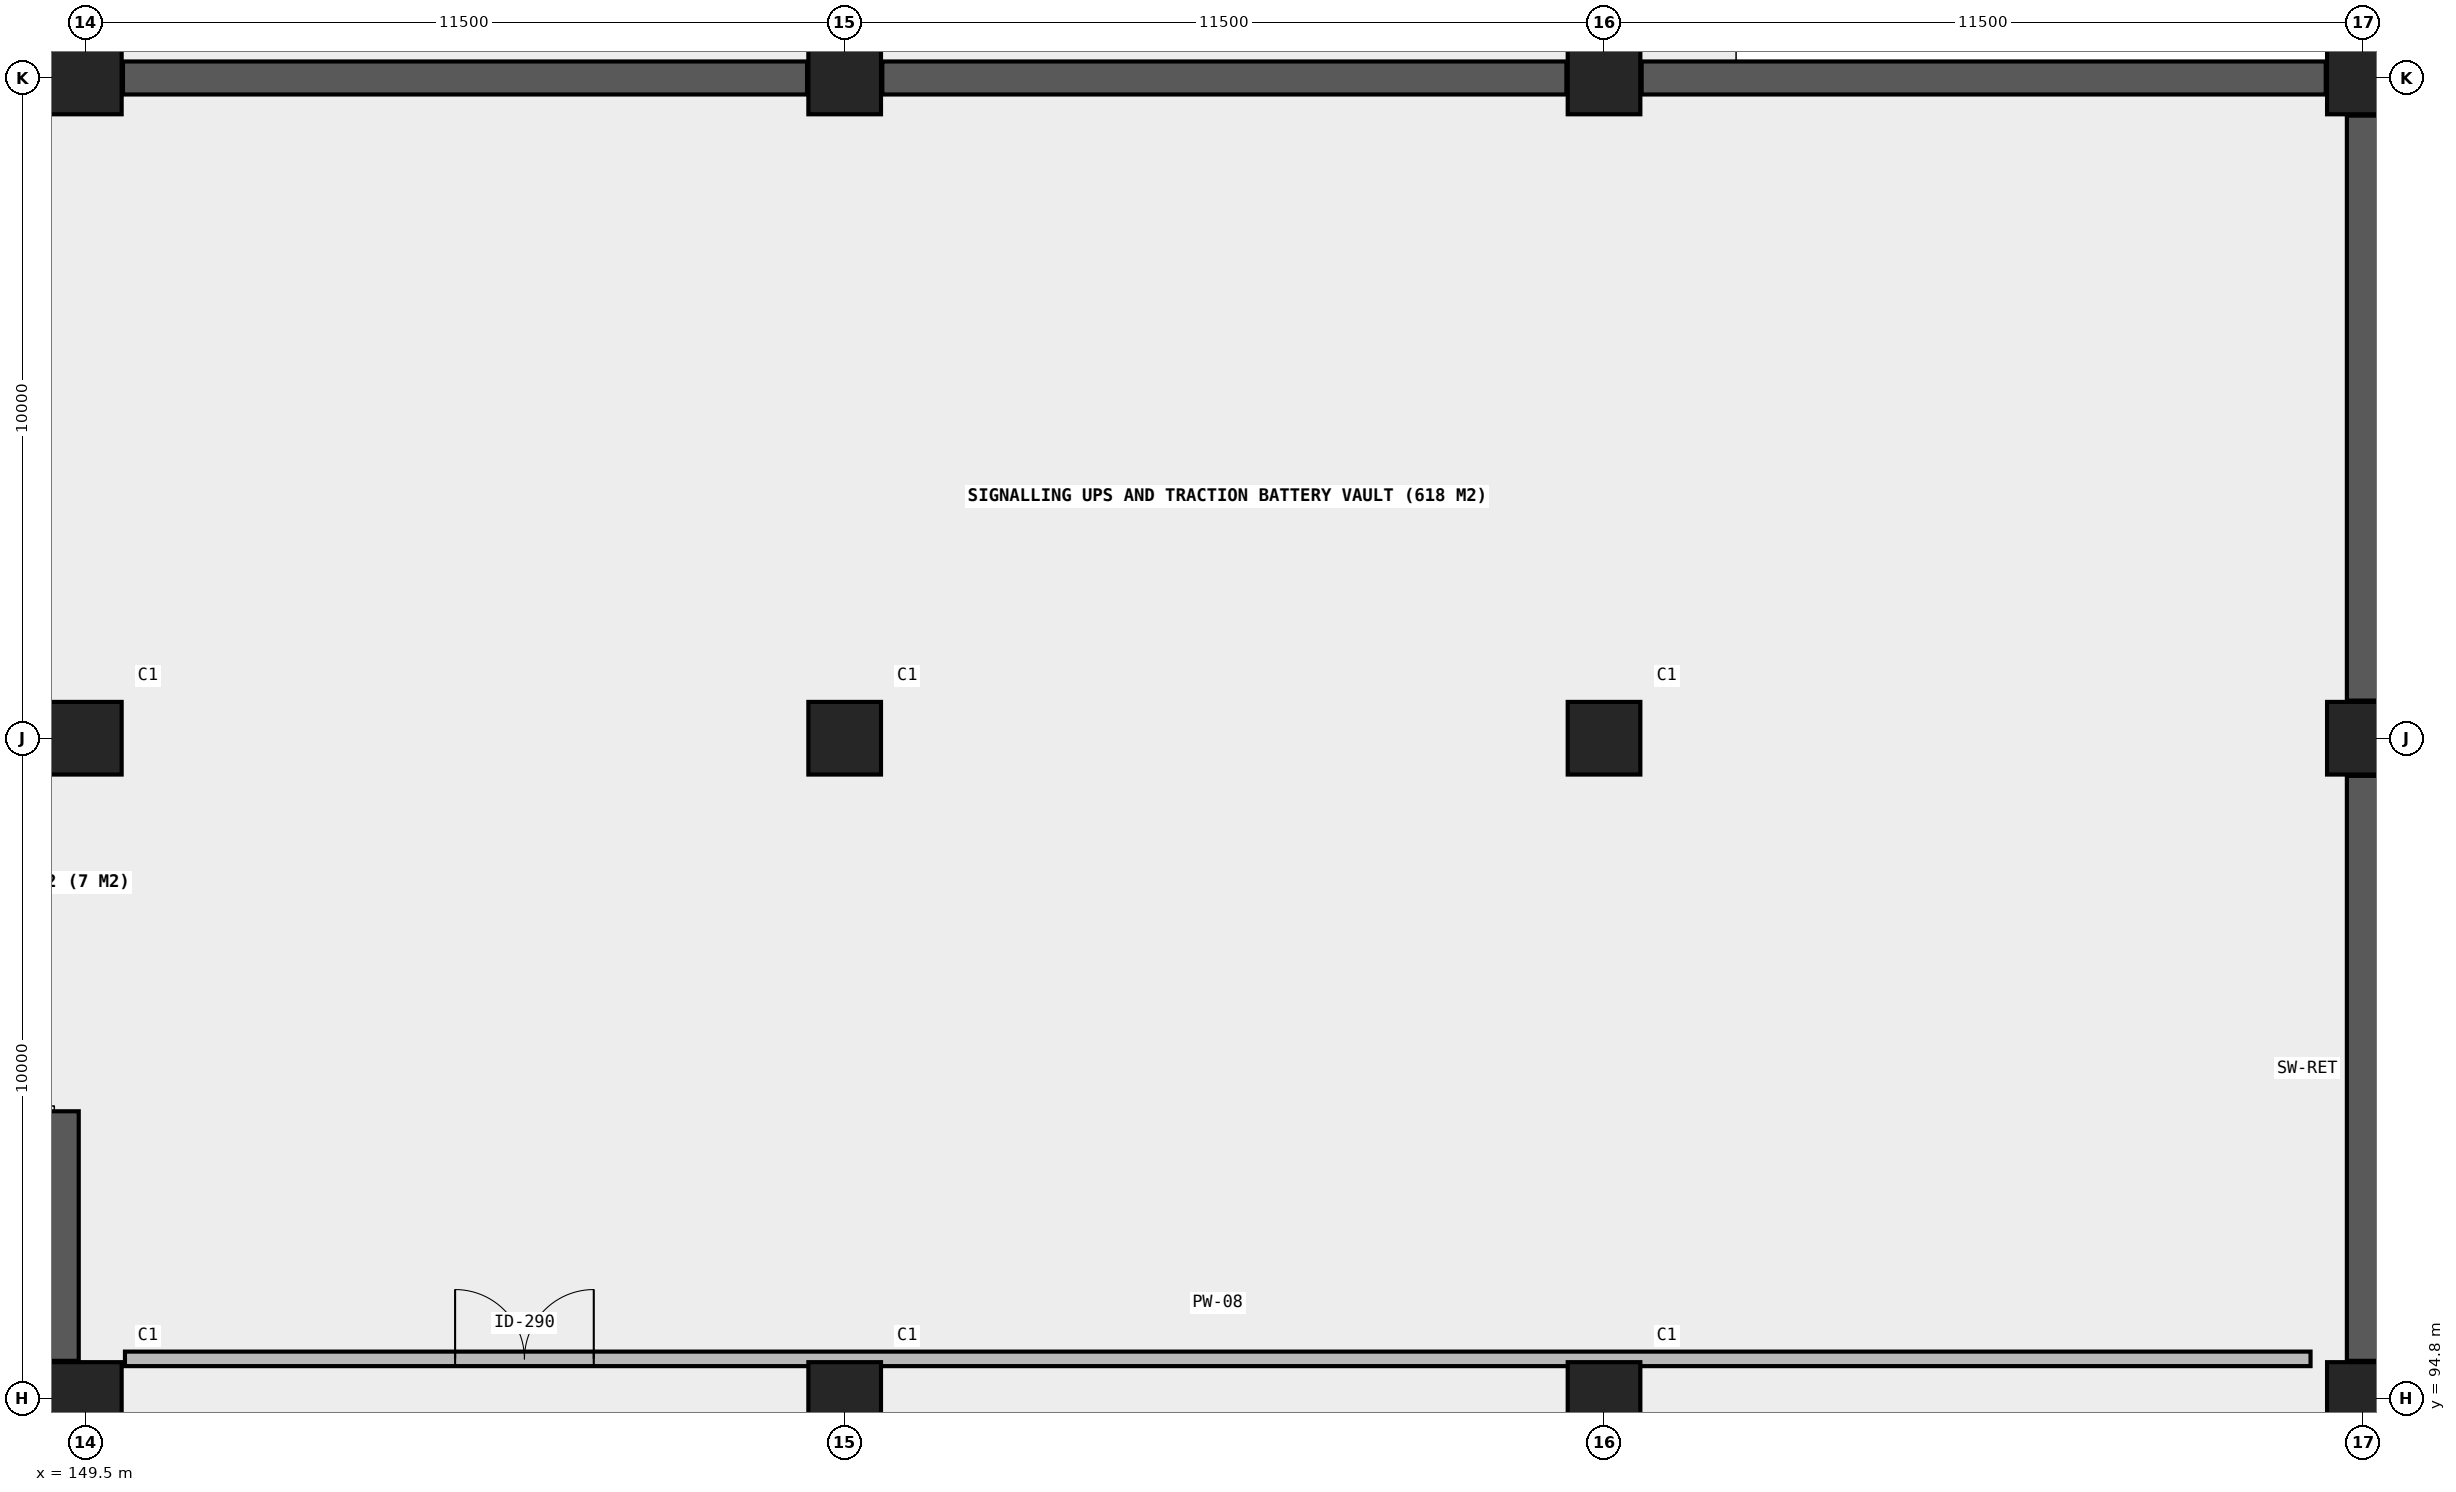
"""IFC4 building model, lengths in metres.
Left out: names, types, materials, properties, quantities, classifications, styles, units other than length and angle.
Written with IfcOpenShell. Run it as: python <this file> out.ifc"""

import sys

from ifc_helpers import new_model, si_unit, direction, frame, frame_2d, origin, origin_2d, place, context, subcontext, project, spatial, rectangle, extrude, element, fill, save


model = new_model("IFC4")
c1 = context("Model", 3, precision=1e-05, world=origin(), true_north=direction((0.0, 1.0)))
c2 = subcontext(c1, "Body", "Model", "MODEL_VIEW")
j1 = project(units=[si_unit("LENGTHUNIT", "METRE"), si_unit("PLANEANGLEUNIT", "RADIAN")], contexts=[c1])
p1 = place(None, origin())
s1 = spatial("IfcSite", under=j1, at=p1, CompositionType="ELEMENT")
p2 = place(p1, origin())
s2 = spatial("IfcBuilding", under=s1, at=p2, CompositionType="ELEMENT")
p3 = place(p2, frame((0.0, 0.0, -8.4)))
s3 = spatial("IfcBuildingStorey", under=s2, at=p3, CompositionType="ELEMENT", Elevation=-8.4)
for number, where, z_axis, x_axis in (
    (1, (149.5, 94.8, 0.0), (0.0, 0.0, 1.0), (1.0, 0.0, 0.0)),
    (2, (149.5, 104.8, 0.0), (0.0, 0.0, 1.0), (1.0, 0.0, 0.0)),
    (3, (149.5, 114.8, 0.0), (0.0, 0.0, 1.0), (1.0, 0.0, 0.0)),
    (4, (161.0, 94.8, 0.0), (0.0, 0.0, 1.0), (1.0, 0.0, 0.0)),
    (5, (161.0, 104.8, 0.0), (0.0, 0.0, 1.0), (1.0, 0.0, 0.0)),
    (6, (161.0, 114.8, 0.0), (0.0, 0.0, 1.0), (1.0, 0.0, 0.0)),
    (7, (172.5, 94.8, 0.0), (0.0, 0.0, 1.0), (1.0, 0.0, 0.0)),
    (8, (172.5, 104.8, 0.0), (0.0, 0.0, 1.0), (1.0, 0.0, 0.0)),
    (9, (172.5, 114.8, 0.0), (0.0, 0.0, 1.0), (1.0, 0.0, 0.0)),
    (10, (184.0, 94.8, 0.0), (0.0, 0.0, 1.0), (1.0, 0.0, 0.0)),
    (11, (184.0, 104.8, 0.0), (0.0, 0.0, 1.0), (1.0, 0.0, 0.0)),
    (12, (184.0, 114.8, 0.0), (0.0, 0.0, 1.0), (1.0, 0.0, 0.0)),
):
    element("IfcColumn", number, at=place(p3, frame(where, z_axis=z_axis, x_axis=x_axis)), inside=s3, PredefinedType="COLUMN", context=c2, shape_type="SweptSolid", body=[
        extrude(rectangle(XDim=1.1, YDim=1.1, at=origin_2d()), origin(), (0.0, 0.0, 1.0), 4.2),
    ])
for number, where, z_axis, x_axis in (
    (13, (184.0, 95.37, 0.0), (0.0, 0.0, 1.0), (0.0, 1.0, 0.0)),
    (14, (184.0, 105.37, 0.0), (0.0, 0.0, 1.0), (0.0, 1.0, 0.0)),
):
    element("IfcWall", number, at=place(p3, frame(where, z_axis=z_axis, x_axis=x_axis)), inside=s3, PredefinedType="SHEAR", context=c2, shape_type="SweptSolid", body=[
        extrude(rectangle(XDim=8.86, YDim=0.5, at=frame_2d((4.43, 0.0))), origin(), (0.0, 0.0, 1.0), 4.2),
    ])
for number, where, z_axis, x_axis in (
    (15, (150.07, 114.8, 0.0), (0.0, 0.0, 1.0), (1.0, 0.0, 0.0)),
    (16, (161.57, 114.8, 0.0), (0.0, 0.0, 1.0), (1.0, 0.0, 0.0)),
    (17, (173.07, 114.8, 0.0), (0.0, 0.0, 1.0), (1.0, 0.0, 0.0)),
):
    element("IfcWall", number, at=place(p3, frame(where, z_axis=z_axis, x_axis=x_axis)), inside=s3, PredefinedType="SHEAR", context=c2, shape_type="SweptSolid", body=[
        extrude(rectangle(XDim=10.36, YDim=0.5, at=frame_2d((5.18, 0.0))), origin(), (0.0, 0.0, 1.0), 4.2),
    ])
p4 = place(p3, frame((149.175, 95.37, 0.0), z_axis=(0.0, 0.0, 1.0), x_axis=(0.0, 1.0, 0.0)))
e18 = element("IfcWall", 18, at=p4, inside=s3, PredefinedType="SHEAR", context=c2, shape_type="SweptSolid", body=[
    extrude(rectangle(XDim=3.78, YDim=0.45, at=frame_2d((1.89, 0.0))), origin(), (0.0, 0.0, 1.0), 4.2),
])
p5 = place(p3, frame((150.1, 95.4, 0.0), z_axis=(0.0, 0.0, 1.0), x_axis=(1.0, 0.0, 0.0)))
e19 = element("IfcWall", 19, at=p5, inside=s3, PredefinedType="SOLIDWALL", context=c2, shape_type="SweptSolid", body=[
    extrude(rectangle(XDim=33.1, YDim=0.22, at=frame_2d((16.55, 0.0))), origin(), (0.0, 0.0, 1.0), 3.9),
])
p6 = place(p5, frame((5.0, 0.0, 0.0)))
e20 = element("IfcOpeningElement", 20, at=p6, cuts=e19, PredefinedType="OPENING", context=c2, shape_type="SweptSolid", body=[
    extrude(rectangle(XDim=2.1, YDim=2.4, at=frame_2d((1.05, 1.2))), frame((0.0, 0.12, 0.0), z_axis=(0.0, -1.0, 0.0), x_axis=(1.0, 0.0, 0.0)), (0.0, 0.0, 1.0), 0.24),
])
p7 = place(p6, origin())
e21 = element("IfcDoor", 21, at=p7, inside=s3, OperationType="DOUBLE_DOOR_SINGLE_SWING", PredefinedType="DOOR", context=c2, shape_type="SweptSolid", body=[
    extrude(rectangle(XDim=2.1, YDim=2.4, at=frame_2d((1.05, 1.2))), frame((0.0, 0.025, 0.0), z_axis=(0.0, -1.0, 0.0), x_axis=(1.0, 0.0, 0.0)), (0.0, 0.0, 1.0), 0.05),
])
fill(e20, e21)
save(model, sys.argv[1])
